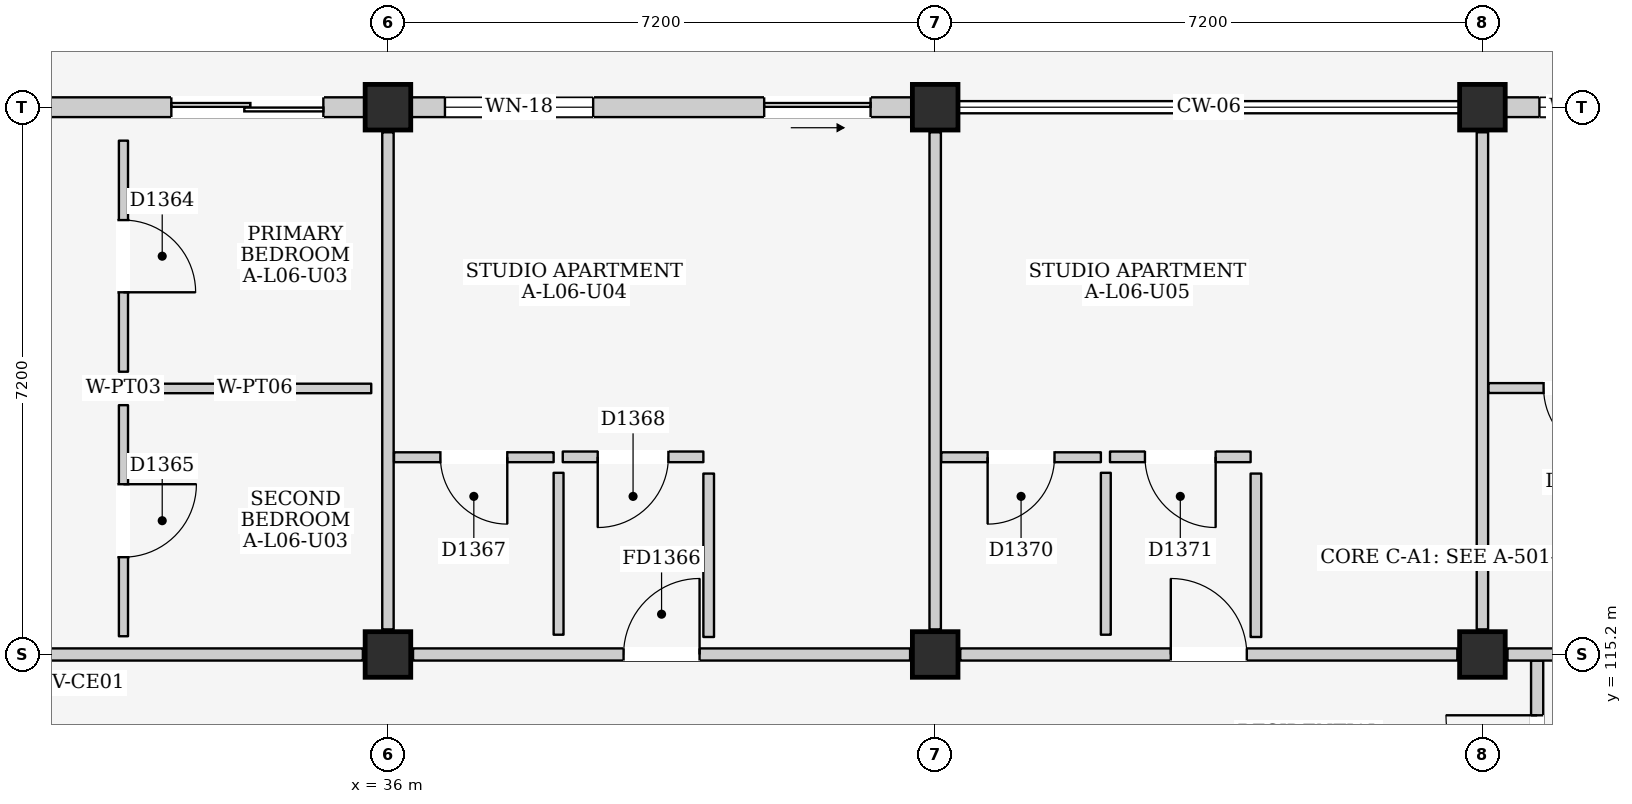
"""IFC4 building model, lengths in metres.
Left out: names, types, materials, properties, quantities, classifications, styles, units other than length and angle.
Written with IfcOpenShell. Run it as: python <this file> out.ifc"""

import sys

from ifc_helpers import new_model, si_unit, direction, frame, frame_2d, origin, origin_2d, place, context, subcontext, project, spatial, rectangle, extrude, element, fill, save


model = new_model("IFC4")
c1 = context("Model", 3, precision=1e-05, world=origin(), true_north=direction((0.0, 1.0)))
c2 = subcontext(c1, "Body", "Model", "MODEL_VIEW")
j1 = project(units=[si_unit("LENGTHUNIT", "METRE"), si_unit("PLANEANGLEUNIT", "RADIAN")], contexts=[c1])
p1 = place(None, origin())
s1 = spatial("IfcSite", under=j1, at=p1, CompositionType="ELEMENT")
p2 = place(p1, origin())
s2 = spatial("IfcBuilding", under=s1, at=p2, CompositionType="ELEMENT")
p3 = place(p2, frame((0.0, 0.0, 21.9)))
s3 = spatial("IfcBuildingStorey", under=s2, at=p3, CompositionType="ELEMENT", Elevation=21.9)
for number, where, z_axis, x_axis in (
    (1, (36.0, 115.2, 0.0), (0.0, 0.0, 1.0), (1.0, 0.0, 0.0)),
    (2, (36.0, 122.4, 0.0), (0.0, 0.0, 1.0), (1.0, 0.0, 0.0)),
    (3, (43.2, 115.2, 0.0), (0.0, 0.0, 1.0), (1.0, 0.0, 0.0)),
    (4, (43.2, 122.4, 0.0), (0.0, 0.0, 1.0), (1.0, 0.0, 0.0)),
    (5, (50.4, 115.2, 0.0), (0.0, 0.0, 1.0), (1.0, 0.0, 0.0)),
    (6, (50.4, 122.4, 0.0), (0.0, 0.0, 1.0), (1.0, 0.0, 0.0)),
):
    element("IfcColumn", number, at=place(p3, frame(where, z_axis=z_axis, x_axis=x_axis)), inside=s3, PredefinedType="COLUMN", context=c2, shape_type="SweptSolid", body=[
        extrude(rectangle(XDim=0.6, YDim=0.6, at=origin_2d()), origin(), (0.0, 0.0, 1.0), 3.2),
    ])
p4 = place(p3, frame((29.1, 122.4, 0.0), z_axis=(0.0, 0.0, 1.0), x_axis=(1.0, 0.0, 0.0)))
e7 = element("IfcWall", 7, at=p4, inside=s3, PredefinedType="ELEMENTEDWALL", context=c2, shape_type="SweptSolid", body=[
    extrude(rectangle(XDim=6.6, YDim=0.26, at=frame_2d((3.3, 0.0))), origin(), (0.0, 0.0, 1.0), 2.515),
])
p5 = place(p4, frame((4.05, 0.0, 0.0)))
e8 = element("IfcOpeningElement", 8, at=p5, cuts=e7, PredefinedType="OPENING", context=c2, shape_type="SweptSolid", body=[
    extrude(rectangle(XDim=2.0, YDim=2.12, at=frame_2d((1.0, 1.06))), frame((0.0, 0.145, 0.0), z_axis=(0.0, -1.0, 0.0), x_axis=(1.0, 0.0, 0.0)), (0.0, 0.0, 1.0), 0.29),
])
p6 = place(p4, frame((0.45, 0.0, 0.9)))
e9 = element("IfcOpeningElement", 9, at=p6, cuts=e7, PredefinedType="OPENING", context=c2, shape_type="SweptSolid", body=[
    extrude(rectangle(XDim=1.25, YDim=1.3, at=frame_2d((0.625, 0.65))), frame((0.0, 0.145, 0.0), z_axis=(0.0, -1.0, 0.0), x_axis=(1.0, 0.0, 0.0)), (0.0, 0.0, 1.0), 0.29),
])
p7 = place(p3, frame((36.3, 122.4, 0.0), z_axis=(0.0, 0.0, 1.0), x_axis=(1.0, 0.0, 0.0)))
e10 = element("IfcWall", 10, at=p7, inside=s3, PredefinedType="ELEMENTEDWALL", context=c2, shape_type="SweptSolid", body=[
    extrude(rectangle(XDim=6.6, YDim=0.26, at=frame_2d((3.3, 0.0))), origin(), (0.0, 0.0, 1.0), 2.515),
])
p8 = place(p7, frame((4.65, 0.0, 0.0)))
e11 = element("IfcOpeningElement", 11, at=p8, cuts=e10, PredefinedType="OPENING", context=c2, shape_type="SweptSolid", body=[
    extrude(rectangle(XDim=1.4, YDim=2.1, at=frame_2d((0.7, 1.05))), frame((0.0, 0.145, 0.0), z_axis=(0.0, -1.0, 0.0), x_axis=(1.0, 0.0, 0.0)), (0.0, 0.0, 1.0), 0.29),
])
p9 = place(p7, frame((0.45, 0.0, 0.855)))
e12 = element("IfcOpeningElement", 12, at=p9, cuts=e10, PredefinedType="OPENING", context=c2, shape_type="SweptSolid", body=[
    extrude(rectangle(XDim=1.95, YDim=1.55, at=frame_2d((0.975, 0.775))), frame((0.0, 0.145, 0.0), z_axis=(0.0, -1.0, 0.0), x_axis=(1.0, 0.0, 0.0)), (0.0, 0.0, 1.0), 0.29),
])
p10 = place(p3, frame((50.7, 122.4, 0.0), z_axis=(0.0, 0.0, 1.0), x_axis=(1.0, 0.0, 0.0)))
e13 = element("IfcWall", 13, at=p10, inside=s3, PredefinedType="ELEMENTEDWALL", context=c2, shape_type="SweptSolid", body=[
    extrude(rectangle(XDim=6.6, YDim=0.26, at=frame_2d((3.3, 0.0))), origin(), (0.0, 0.0, 1.0), 2.515),
])
p11 = place(p10, frame((4.45, 0.0, 0.0)))
e14 = element("IfcOpeningElement", 14, at=p11, cuts=e13, PredefinedType="OPENING", context=c2, shape_type="SweptSolid", body=[
    extrude(rectangle(XDim=1.6, YDim=2.12, at=frame_2d((0.8, 1.06))), frame((0.0, 0.145, 0.0), z_axis=(0.0, -1.0, 0.0), x_axis=(1.0, 0.0, 0.0)), (0.0, 0.0, 1.0), 0.29),
])
p12 = place(p10, frame((0.45, 0.0, 0.9)))
e15 = element("IfcOpeningElement", 15, at=p12, cuts=e13, PredefinedType="OPENING", context=c2, shape_type="SweptSolid", body=[
    extrude(rectangle(XDim=1.15, YDim=1.15, at=frame_2d((0.575, 0.575))), frame((0.0, 0.145, 0.0), z_axis=(0.0, -1.0, 0.0), x_axis=(1.0, 0.0, 0.0)), (0.0, 0.0, 1.0), 0.29),
])
p13 = place(p3, frame((51.12, 111.1, 0.0), z_axis=(0.0, 0.0, 1.0), x_axis=(0.0, 1.0, 0.0)))
e16 = element("IfcWall", 16, at=p13, inside=s3, PredefinedType="PARTITIONING", context=c2, shape_type="SweptSolid", body=[
    extrude(rectangle(XDim=4.02, YDim=0.16, at=frame_2d((2.01, 0.0))), origin(), (0.0, 0.0, 1.0), 2.98),
])
p14 = place(p13, frame((2.1, 0.0, 0.0)))
e17 = element("IfcOpeningElement", 17, at=p14, cuts=e16, PredefinedType="OPENING", context=c2, shape_type="SweptSolid", body=[
    extrude(rectangle(XDim=1.2, YDim=2.2, at=frame_2d((0.6, 1.1))), frame((0.0, 0.095, 0.0), z_axis=(0.0, -1.0, 0.0), x_axis=(1.0, 0.0, 0.0)), (0.0, 0.0, 1.0), 0.19),
])
p15 = place(p3, frame((29.13, 115.2, 0.0), z_axis=(0.0, 0.0, 1.0), x_axis=(1.0, 0.0, 0.0)))
e18 = element("IfcWall", 18, at=p15, inside=s3, PredefinedType="PARTITIONING", context=c2, shape_type="SweptSolid", body=[
    extrude(rectangle(XDim=6.54, YDim=0.16, at=frame_2d((3.27, 0.0))), origin(), (0.0, 0.0, 1.0), 2.315),
])
p16 = place(p3, frame((36.0, 115.53, 0.0), z_axis=(0.0, 0.0, 1.0), x_axis=(0.0, 1.0, 0.0)))
e19 = element("IfcWall", 19, at=p16, inside=s3, PredefinedType="PARTITIONING", context=c2, shape_type="SweptSolid", body=[
    extrude(rectangle(XDim=6.54, YDim=0.15, at=frame_2d((3.27, 0.0))), origin(), (0.0, 0.0, 1.0), 2.465),
])
p17 = place(p3, frame((32.52, 118.92, 0.0), z_axis=(0.0, 0.0, 1.0), x_axis=(0.0, 1.0, 0.0)))
e20 = element("IfcWall", 20, at=p17, inside=s3, PredefinedType="PARTITIONING", context=c2, shape_type="SweptSolid", body=[
    extrude(rectangle(XDim=3.04, YDim=0.12, at=frame_2d((1.52, 0.0))), origin(), (0.0, 0.0, 1.0), 2.98),
])
p18 = place(p17, frame((1.045, 0.0, 0.0)))
e21 = element("IfcOpeningElement", 21, at=p18, cuts=e20, PredefinedType="OPENING", context=c2, shape_type="SweptSolid", body=[
    extrude(rectangle(XDim=0.95, YDim=2.15, at=frame_2d((0.475, 1.075))), frame((0.0, 0.075, 0.0), z_axis=(0.0, -1.0, 0.0), x_axis=(1.0, 0.0, 0.0)), (0.0, 0.0, 1.0), 0.15),
])
p19 = place(p3, frame((32.72, 118.7, 0.0), z_axis=(0.0, 0.0, 1.0), x_axis=(1.0, 0.0, 0.0)))
e22 = element("IfcWall", 22, at=p19, inside=s3, PredefinedType="PARTITIONING", context=c2, shape_type="SweptSolid", body=[
    extrude(rectangle(XDim=3.06, YDim=0.125, at=frame_2d((1.53, 0.0))), origin(), (0.0, 0.0, 1.0), 2.98),
])
p20 = place(p3, frame((32.52, 115.44, 0.0), z_axis=(0.0, 0.0, 1.0), x_axis=(0.0, 1.0, 0.0)))
e23 = element("IfcWall", 23, at=p20, inside=s3, PredefinedType="PARTITIONING", context=c2, shape_type="SweptSolid", body=[
    extrude(rectangle(XDim=3.04, YDim=0.12, at=frame_2d((1.52, 0.0))), origin(), (0.0, 0.0, 1.0), 2.98),
])
p21 = place(p20, frame((1.04, 0.0, 0.0)))
e24 = element("IfcOpeningElement", 24, at=p21, cuts=e23, PredefinedType="OPENING", context=c2, shape_type="SweptSolid", body=[
    extrude(rectangle(XDim=0.96, YDim=2.15, at=frame_2d((0.48, 1.075))), frame((0.0, 0.075, 0.0), z_axis=(0.0, -1.0, 0.0), x_axis=(1.0, 0.0, 0.0)), (0.0, 0.0, 1.0), 0.15),
])
p22 = place(p3, frame((36.33, 115.2, 0.0), z_axis=(0.0, 0.0, 1.0), x_axis=(1.0, 0.0, 0.0)))
e25 = element("IfcWall", 25, at=p22, inside=s3, PredefinedType="PARTITIONING", context=c2, shape_type="SweptSolid", body=[
    extrude(rectangle(XDim=6.54, YDim=0.16, at=frame_2d((3.27, 0.0))), origin(), (0.0, 0.0, 1.0), 2.315),
])
p23 = place(p22, frame((2.77, 0.0, 0.0)))
e26 = element("IfcOpeningElement", 26, at=p23, cuts=e25, PredefinedType="OPENING", context=c2, shape_type="SweptSolid", body=[
    extrude(rectangle(XDim=1.0, YDim=2.15, at=frame_2d((0.5, 1.075))), frame((0.0, 0.095, 0.0), z_axis=(0.0, -1.0, 0.0), x_axis=(1.0, 0.0, 0.0)), (0.0, 0.0, 1.0), 0.19),
])
p24 = place(p3, frame((43.2, 115.53, 0.0), z_axis=(0.0, 0.0, 1.0), x_axis=(0.0, 1.0, 0.0)))
e27 = element("IfcWall", 27, at=p24, inside=s3, PredefinedType="PARTITIONING", context=c2, shape_type="SweptSolid", body=[
    extrude(rectangle(XDim=6.54, YDim=0.15, at=frame_2d((3.27, 0.0))), origin(), (0.0, 0.0, 1.0), 2.465),
])
p25 = place(p3, frame((36.08, 117.795, 0.0), z_axis=(0.0, 0.0, 1.0), x_axis=(1.0, 0.0, 0.0)))
e28 = element("IfcWall", 28, at=p25, inside=s3, PredefinedType="PARTITIONING", context=c2, shape_type="SweptSolid", body=[
    extrude(rectangle(XDim=2.1, YDim=0.13, at=frame_2d((1.05, 0.0))), origin(), (0.0, 0.0, 1.0), 2.98),
])
p26 = place(p25, frame((0.61, 0.0, 0.0)))
e29 = element("IfcOpeningElement", 29, at=p26, cuts=e28, PredefinedType="OPENING", context=c2, shape_type="SweptSolid", body=[
    extrude(rectangle(XDim=0.88, YDim=2.1, at=frame_2d((0.44, 1.05))), frame((0.0, 0.08, 0.0), z_axis=(0.0, -1.0, 0.0), x_axis=(1.0, 0.0, 0.0)), (0.0, 0.0, 1.0), 0.16),
])
p27 = place(p3, frame((38.245, 115.46, 0.0), z_axis=(0.0, 0.0, 1.0), x_axis=(0.0, 1.0, 0.0)))
e30 = element("IfcWall", 30, at=p27, inside=s3, PredefinedType="PARTITIONING", context=c2, shape_type="SweptSolid", body=[
    extrude(rectangle(XDim=2.13, YDim=0.13, at=frame_2d((1.065, 0.0))), origin(), (0.0, 0.0, 1.0), 2.98),
])
p28 = place(p3, frame((38.3, 117.8, 0.0), z_axis=(0.0, 0.0, 1.0), x_axis=(1.0, 0.0, 0.0)))
e31 = element("IfcWall", 31, at=p28, inside=s3, PredefinedType="PARTITIONING", context=c2, shape_type="SweptSolid", body=[
    extrude(rectangle(XDim=1.85, YDim=0.14, at=frame_2d((0.925, 0.0))), origin(), (0.0, 0.0, 1.0), 2.98),
])
p29 = place(p28, frame((0.46, 0.0, 0.0)))
e32 = element("IfcOpeningElement", 32, at=p29, cuts=e31, PredefinedType="OPENING", context=c2, shape_type="SweptSolid", body=[
    extrude(rectangle(XDim=0.93, YDim=2.14, at=frame_2d((0.465, 1.07))), frame((0.0, 0.085, 0.0), z_axis=(0.0, -1.0, 0.0), x_axis=(1.0, 0.0, 0.0)), (0.0, 0.0, 1.0), 0.17),
])
p30 = place(p3, frame((40.22, 115.43, 0.0), z_axis=(0.0, 0.0, 1.0), x_axis=(0.0, 1.0, 0.0)))
e33 = element("IfcWall", 33, at=p30, inside=s3, PredefinedType="PARTITIONING", context=c2, shape_type="SweptSolid", body=[
    extrude(rectangle(XDim=2.15, YDim=0.14, at=frame_2d((1.075, 0.0))), origin(), (0.0, 0.0, 1.0), 2.98),
])
p31 = place(p3, frame((43.53, 115.2, 0.0), z_axis=(0.0, 0.0, 1.0), x_axis=(1.0, 0.0, 0.0)))
e34 = element("IfcWall", 34, at=p31, inside=s3, PredefinedType="PARTITIONING", context=c2, shape_type="SweptSolid", body=[
    extrude(rectangle(XDim=6.54, YDim=0.16, at=frame_2d((3.27, 0.0))), origin(), (0.0, 0.0, 1.0), 2.315),
])
p32 = place(p31, frame((2.77, 0.0, 0.0)))
e35 = element("IfcOpeningElement", 35, at=p32, cuts=e34, PredefinedType="OPENING", context=c2, shape_type="SweptSolid", body=[
    extrude(rectangle(XDim=1.0, YDim=2.15, at=frame_2d((0.5, 1.075))), frame((0.0, 0.095, 0.0), z_axis=(0.0, -1.0, 0.0), x_axis=(1.0, 0.0, 0.0)), (0.0, 0.0, 1.0), 0.19),
])
p33 = place(p3, frame((50.4, 115.53, 0.0), z_axis=(0.0, 0.0, 1.0), x_axis=(0.0, 1.0, 0.0)))
e36 = element("IfcWall", 36, at=p33, inside=s3, PredefinedType="PARTITIONING", context=c2, shape_type="SweptSolid", body=[
    extrude(rectangle(XDim=6.54, YDim=0.15, at=frame_2d((3.27, 0.0))), origin(), (0.0, 0.0, 1.0), 2.465),
])
p34 = place(p3, frame((43.28, 117.795, 0.0), z_axis=(0.0, 0.0, 1.0), x_axis=(1.0, 0.0, 0.0)))
e37 = element("IfcWall", 37, at=p34, inside=s3, PredefinedType="PARTITIONING", context=c2, shape_type="SweptSolid", body=[
    extrude(rectangle(XDim=2.1, YDim=0.13, at=frame_2d((1.05, 0.0))), origin(), (0.0, 0.0, 1.0), 2.98),
])
p35 = place(p34, frame((0.61, 0.0, 0.0)))
e38 = element("IfcOpeningElement", 38, at=p35, cuts=e37, PredefinedType="OPENING", context=c2, shape_type="SweptSolid", body=[
    extrude(rectangle(XDim=0.88, YDim=2.1, at=frame_2d((0.44, 1.05))), frame((0.0, 0.08, 0.0), z_axis=(0.0, -1.0, 0.0), x_axis=(1.0, 0.0, 0.0)), (0.0, 0.0, 1.0), 0.16),
])
p36 = place(p3, frame((45.445, 115.46, 0.0), z_axis=(0.0, 0.0, 1.0), x_axis=(0.0, 1.0, 0.0)))
e39 = element("IfcWall", 39, at=p36, inside=s3, PredefinedType="PARTITIONING", context=c2, shape_type="SweptSolid", body=[
    extrude(rectangle(XDim=2.13, YDim=0.13, at=frame_2d((1.065, 0.0))), origin(), (0.0, 0.0, 1.0), 2.98),
])
p37 = place(p3, frame((45.5, 117.8, 0.0), z_axis=(0.0, 0.0, 1.0), x_axis=(1.0, 0.0, 0.0)))
e40 = element("IfcWall", 40, at=p37, inside=s3, PredefinedType="PARTITIONING", context=c2, shape_type="SweptSolid", body=[
    extrude(rectangle(XDim=1.85, YDim=0.14, at=frame_2d((0.925, 0.0))), origin(), (0.0, 0.0, 1.0), 2.98),
])
p38 = place(p37, frame((0.46, 0.0, 0.0)))
e41 = element("IfcOpeningElement", 41, at=p38, cuts=e40, PredefinedType="OPENING", context=c2, shape_type="SweptSolid", body=[
    extrude(rectangle(XDim=0.93, YDim=2.14, at=frame_2d((0.465, 1.07))), frame((0.0, 0.085, 0.0), z_axis=(0.0, -1.0, 0.0), x_axis=(1.0, 0.0, 0.0)), (0.0, 0.0, 1.0), 0.17),
])
p39 = place(p3, frame((47.42, 115.43, 0.0), z_axis=(0.0, 0.0, 1.0), x_axis=(0.0, 1.0, 0.0)))
e42 = element("IfcWall", 42, at=p39, inside=s3, PredefinedType="PARTITIONING", context=c2, shape_type="SweptSolid", body=[
    extrude(rectangle(XDim=2.15, YDim=0.14, at=frame_2d((1.075, 0.0))), origin(), (0.0, 0.0, 1.0), 2.98),
])
p40 = place(p3, frame((50.73, 115.2, 0.0), z_axis=(0.0, 0.0, 1.0), x_axis=(1.0, 0.0, 0.0)))
e43 = element("IfcWall", 43, at=p40, inside=s3, PredefinedType="PARTITIONING", context=c2, shape_type="SweptSolid", body=[
    extrude(rectangle(XDim=6.54, YDim=0.16, at=frame_2d((3.27, 0.0))), origin(), (0.0, 0.0, 1.0), 2.315),
])
p41 = place(p3, frame((50.48, 118.705, 0.0), z_axis=(0.0, 0.0, 1.0), x_axis=(1.0, 0.0, 0.0)))
e44 = element("IfcWall", 44, at=p41, inside=s3, PredefinedType="PARTITIONING", context=c2, shape_type="SweptSolid", body=[
    extrude(rectangle(XDim=2.35, YDim=0.13, at=frame_2d((1.175, 0.0))), origin(), (0.0, 0.0, 1.0), 2.98),
])
p42 = place(p41, frame((0.725, 0.0, 0.0)))
e45 = element("IfcOpeningElement", 45, at=p42, cuts=e44, PredefinedType="OPENING", context=c2, shape_type="SweptSolid", body=[
    extrude(rectangle(XDim=0.9, YDim=2.1, at=frame_2d((0.45, 1.05))), frame((0.0, 0.08, 0.0), z_axis=(0.0, -1.0, 0.0), x_axis=(1.0, 0.0, 0.0)), (0.0, 0.0, 1.0), 0.16),
])
p43 = place(p5, frame((2.0, 0.0, 0.0), z_axis=(0.0, 0.0, 1.0), x_axis=(-1.0, 0.0, 0.0)))
e46 = element("IfcDoor", 46, at=p43, inside=s3, OperationType="DOUBLE_DOOR_SLIDING", PredefinedType="DOOR", context=c2, shape_type="SweptSolid", body=[
    extrude(rectangle(XDim=2.0, YDim=2.12, at=frame_2d((1.0, 1.06))), frame((0.0, 0.025, 0.0), z_axis=(0.0, -1.0, 0.0), x_axis=(1.0, 0.0, 0.0)), (0.0, 0.0, 1.0), 0.05),
])
fill(e8, e46)
p44 = place(p8, frame((1.4, 0.0, 0.0), z_axis=(0.0, 0.0, 1.0), x_axis=(-1.0, 0.0, 0.0)))
e47 = element("IfcDoor", 47, at=p44, inside=s3, OperationType="SLIDING_TO_RIGHT", PredefinedType="DOOR", context=c2, shape_type="SweptSolid", body=[
    extrude(rectangle(XDim=1.4, YDim=2.1, at=frame_2d((0.7, 1.05))), frame((0.0, 0.025, 0.0), z_axis=(0.0, -1.0, 0.0), x_axis=(1.0, 0.0, 0.0)), (0.0, 0.0, 1.0), 0.05),
])
fill(e11, e47)
p45 = place(p9, origin())
e48 = element("IfcWindow", 48, at=p45, inside=s3, PartitioningType="DOUBLE_PANEL_VERTICAL", PredefinedType="WINDOW", context=c2, shape_type="SweptSolid", body=[
    extrude(rectangle(XDim=1.95, YDim=1.55, at=frame_2d((0.975, 0.775))), frame((0.0, 0.03, 0.0), z_axis=(0.0, -1.0, 0.0), x_axis=(1.0, 0.0, 0.0)), (0.0, 0.0, 1.0), 0.06),
])
fill(e12, e48)
p46 = place(p12, origin())
e49 = element("IfcWindow", 49, at=p46, inside=s3, PartitioningType="SINGLE_PANEL", PredefinedType="WINDOW", context=c2, shape_type="SweptSolid", body=[
    extrude(rectangle(XDim=1.15, YDim=1.15, at=frame_2d((0.575, 0.575))), frame((0.0, 0.03, 0.0), z_axis=(0.0, -1.0, 0.0), x_axis=(1.0, 0.0, 0.0)), (0.0, 0.0, 1.0), 0.06),
])
fill(e15, e49)
p47 = place(p14, origin())
e50 = element("IfcDoor", 50, at=p47, inside=s3, OperationType="SINGLE_SWING_RIGHT", PredefinedType="DOOR", context=c2, shape_type="SweptSolid", body=[
    extrude(rectangle(XDim=1.2, YDim=2.2, at=frame_2d((0.6, 1.1))), frame((0.0, 0.025, 0.0), z_axis=(0.0, -1.0, 0.0), x_axis=(1.0, 0.0, 0.0)), (0.0, 0.0, 1.0), 0.05),
])
fill(e17, e50)
p48 = place(p18, frame((0.95, 0.0, 0.0), z_axis=(0.0, 0.0, 1.0), x_axis=(-1.0, 0.0, 0.0)))
e51 = element("IfcDoor", 51, at=p48, inside=s3, OperationType="SINGLE_SWING_RIGHT", PredefinedType="DOOR", context=c2, shape_type="SweptSolid", body=[
    extrude(rectangle(XDim=0.95, YDim=2.15, at=frame_2d((0.475, 1.075))), frame((0.0, 0.025, 0.0), z_axis=(0.0, -1.0, 0.0), x_axis=(1.0, 0.0, 0.0)), (0.0, 0.0, 1.0), 0.05),
])
fill(e21, e51)
p49 = place(p21, frame((0.96, 0.0, 0.0), z_axis=(0.0, 0.0, 1.0), x_axis=(-1.0, 0.0, 0.0)))
e52 = element("IfcDoor", 52, at=p49, inside=s3, OperationType="SINGLE_SWING_LEFT", PredefinedType="DOOR", context=c2, shape_type="SweptSolid", body=[
    extrude(rectangle(XDim=0.96, YDim=2.15, at=frame_2d((0.48, 1.075))), frame((0.0, 0.025, 0.0), z_axis=(0.0, -1.0, 0.0), x_axis=(1.0, 0.0, 0.0)), (0.0, 0.0, 1.0), 0.05),
])
fill(e24, e52)
p50 = place(p23, origin())
e53 = element("IfcDoor", 53, at=p50, inside=s3, OperationType="SINGLE_SWING_RIGHT", PredefinedType="DOOR", context=c2, shape_type="SweptSolid", body=[
    extrude(rectangle(XDim=1.0, YDim=2.15, at=frame_2d((0.5, 1.075))), frame((0.0, 0.025, 0.0), z_axis=(0.0, -1.0, 0.0), x_axis=(1.0, 0.0, 0.0)), (0.0, 0.0, 1.0), 0.05),
])
fill(e26, e53)
p51 = place(p26, frame((0.88, 0.0, 0.0), z_axis=(0.0, 0.0, 1.0), x_axis=(-1.0, 0.0, 0.0)))
e54 = element("IfcDoor", 54, at=p51, inside=s3, OperationType="SINGLE_SWING_LEFT", PredefinedType="DOOR", context=c2, shape_type="SweptSolid", body=[
    extrude(rectangle(XDim=0.88, YDim=2.1, at=frame_2d((0.44, 1.05))), frame((0.0, 0.025, 0.0), z_axis=(0.0, -1.0, 0.0), x_axis=(1.0, 0.0, 0.0)), (0.0, 0.0, 1.0), 0.05),
])
fill(e29, e54)
p52 = place(p29, frame((0.93, 0.0, 0.0), z_axis=(0.0, 0.0, 1.0), x_axis=(-1.0, 0.0, 0.0)))
e55 = element("IfcDoor", 55, at=p52, inside=s3, OperationType="SINGLE_SWING_RIGHT", PredefinedType="DOOR", context=c2, shape_type="SweptSolid", body=[
    extrude(rectangle(XDim=0.93, YDim=2.14, at=frame_2d((0.465, 1.07))), frame((0.0, 0.025, 0.0), z_axis=(0.0, -1.0, 0.0), x_axis=(1.0, 0.0, 0.0)), (0.0, 0.0, 1.0), 0.05),
])
fill(e32, e55)
p53 = place(p32, origin())
e56 = element("IfcDoor", 56, at=p53, inside=s3, OperationType="SINGLE_SWING_LEFT", PredefinedType="DOOR", context=c2, shape_type="SweptSolid", body=[
    extrude(rectangle(XDim=1.0, YDim=2.15, at=frame_2d((0.5, 1.075))), frame((0.0, 0.025, 0.0), z_axis=(0.0, -1.0, 0.0), x_axis=(1.0, 0.0, 0.0)), (0.0, 0.0, 1.0), 0.05),
])
fill(e35, e56)
p54 = place(p35, frame((0.88, 0.0, 0.0), z_axis=(0.0, 0.0, 1.0), x_axis=(-1.0, 0.0, 0.0)))
e57 = element("IfcDoor", 57, at=p54, inside=s3, OperationType="SINGLE_SWING_RIGHT", PredefinedType="DOOR", context=c2, shape_type="SweptSolid", body=[
    extrude(rectangle(XDim=0.88, YDim=2.1, at=frame_2d((0.44, 1.05))), frame((0.0, 0.025, 0.0), z_axis=(0.0, -1.0, 0.0), x_axis=(1.0, 0.0, 0.0)), (0.0, 0.0, 1.0), 0.05),
])
fill(e38, e57)
p55 = place(p38, frame((0.93, 0.0, 0.0), z_axis=(0.0, 0.0, 1.0), x_axis=(-1.0, 0.0, 0.0)))
e58 = element("IfcDoor", 58, at=p55, inside=s3, OperationType="SINGLE_SWING_LEFT", PredefinedType="DOOR", context=c2, shape_type="SweptSolid", body=[
    extrude(rectangle(XDim=0.93, YDim=2.14, at=frame_2d((0.465, 1.07))), frame((0.0, 0.025, 0.0), z_axis=(0.0, -1.0, 0.0), x_axis=(1.0, 0.0, 0.0)), (0.0, 0.0, 1.0), 0.05),
])
fill(e41, e58)
p56 = place(p42, frame((0.9, 0.0, 0.0), z_axis=(0.0, 0.0, 1.0), x_axis=(-1.0, 0.0, 0.0)))
e59 = element("IfcDoor", 59, at=p56, inside=s3, OperationType="SINGLE_SWING_LEFT", PredefinedType="DOOR", context=c2, shape_type="SweptSolid", body=[
    extrude(rectangle(XDim=0.9, YDim=2.1, at=frame_2d((0.45, 1.05))), frame((0.0, 0.025, 0.0), z_axis=(0.0, -1.0, 0.0), x_axis=(1.0, 0.0, 0.0)), (0.0, 0.0, 1.0), 0.05),
])
fill(e45, e59)
save(model, sys.argv[1])
